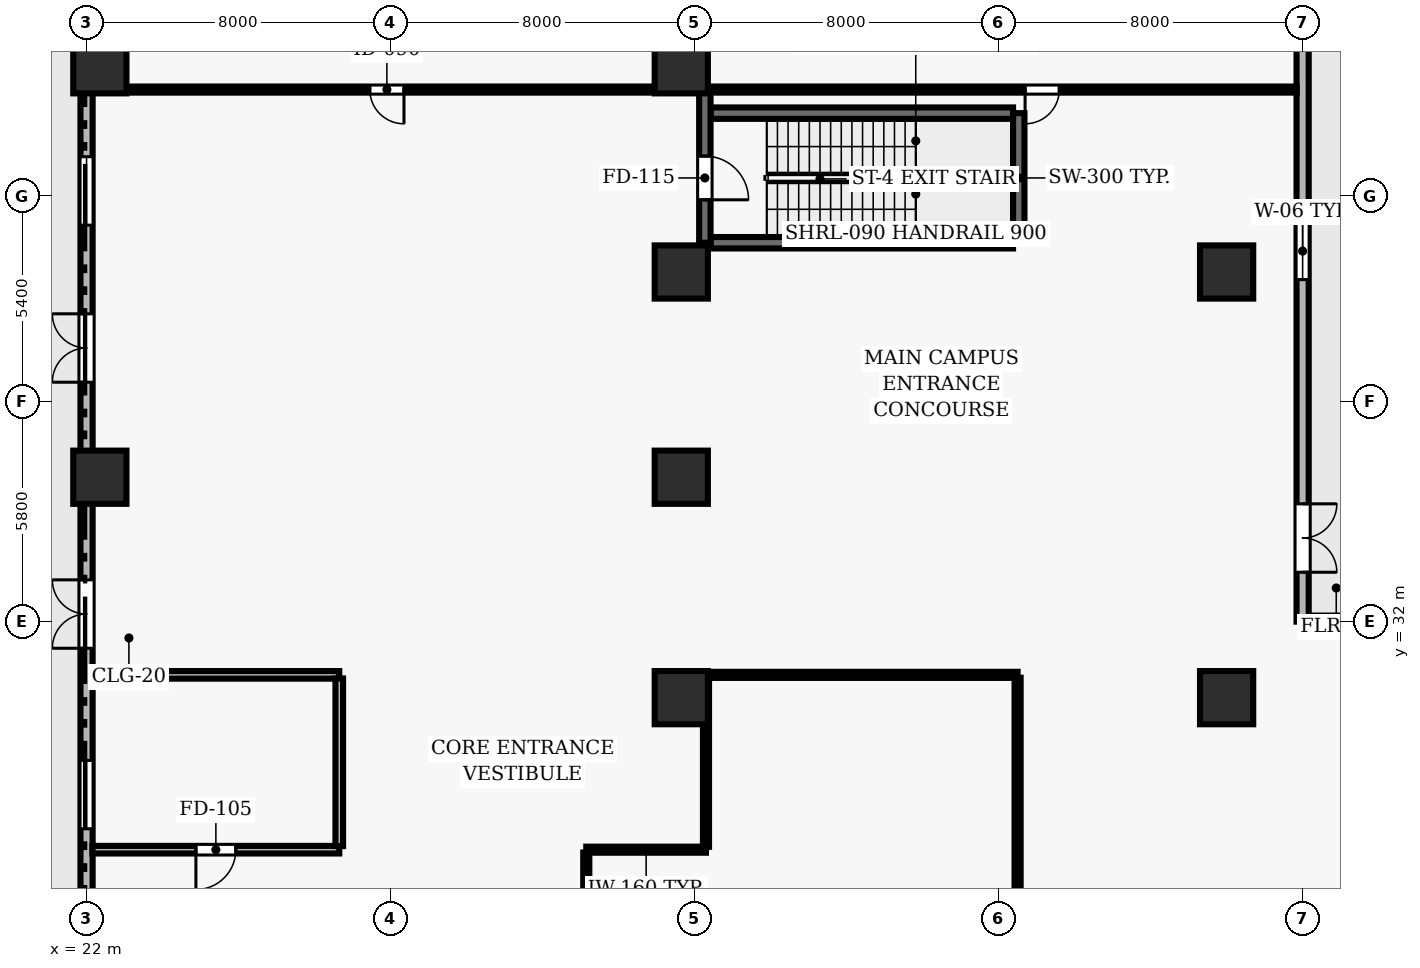
"""IFC4 building model, lengths in metres.
Left out: names, types, materials, properties, quantities, classifications, styles, units other than length and angle.
Written with IfcOpenShell. Run it as: python <this file> out.ifc"""

import sys

from ifc_helpers import new_model, si_unit, direction, frame, frame_2d, origin, origin_2d, place, context, subcontext, project, spatial, rectangle, extrude, element, fill, save


model = new_model("IFC4")
c1 = context("Model", 3, precision=1e-05, world=origin(), true_north=direction((0.0, 1.0)))
c2 = subcontext(c1, "Body", "Model", "MODEL_VIEW")
j1 = project(units=[si_unit("LENGTHUNIT", "METRE"), si_unit("PLANEANGLEUNIT", "RADIAN")], contexts=[c1])
p1 = place(None, origin())
s1 = spatial("IfcSite", under=j1, at=p1, CompositionType="ELEMENT")
p2 = place(p1, origin())
s2 = spatial("IfcBuilding", under=s1, at=p2, CompositionType="ELEMENT")
p3 = place(p2, origin())
s3 = spatial("IfcBuildingStorey", under=s2, at=p3, CompositionType="ELEMENT", Elevation=0.0)
for number, where, z_axis, x_axis in (
    (1, (37.65, 30.0, 0.0), (0.0, 0.0, 1.0), (1.0, 0.0, 0.0)),
    (2, (22.35, 35.8, 0.0), (0.0, 0.0, 1.0), (1.0, 0.0, 0.0)),
    (3, (37.65, 35.8, 0.0), (0.0, 0.0, 1.0), (1.0, 0.0, 0.0)),
    (4, (37.65, 41.2, 0.0), (0.0, 0.0, 1.0), (1.0, 0.0, 0.0)),
    (5, (22.35, 46.6, 0.0), (0.0, 0.0, 1.0), (1.0, 0.0, 0.0)),
    (6, (37.65, 46.6, 0.0), (0.0, 0.0, 1.0), (1.0, 0.0, 0.0)),
    (7, (52.0, 30.0, 0.0), (0.0, 0.0, 1.0), (1.0, 0.0, 0.0)),
    (8, (52.0, 41.2, 0.0), (0.0, 0.0, 1.0), (1.0, 0.0, 0.0)),
):
    element("IfcColumn", number, at=place(p3, frame(where, z_axis=z_axis, x_axis=x_axis)), inside=s3, PredefinedType="COLUMN", context=c2, shape_type="SweptSolid", body=[
        extrude(rectangle(XDim=1.4, YDim=1.4, at=origin_2d()), origin(), (0.0, 0.0, 1.0), 5.2),
    ])
p4 = place(p3, frame((73.5, 32.0, 0.0), z_axis=(0.0, 0.0, 1.0), x_axis=(-1.0, 0.0, 0.0)))
e9 = element("IfcWall", 9, at=p4, inside=s3, PredefinedType="SOLIDWALL", context=c2, shape_type="SweptSolid", body=[
    extrude(rectangle(XDim=19.5, YDim=0.32, at=frame_2d((9.75, 0.0))), origin(), (0.0, 0.0, 1.0), 4.92),
])
p5 = place(p4, frame((15.1, 0.0, 0.0)))
e10 = element("IfcOpeningElement", 10, at=p5, cuts=e9, PredefinedType="OPENING", context=c2, shape_type="SweptSolid", body=[
    extrude(rectangle(XDim=1.8, YDim=2.4, at=frame_2d((0.9, 1.2))), frame((0.0, 0.17, 0.0), z_axis=(0.0, -1.0, 0.0), x_axis=(1.0, 0.0, 0.0)), (0.0, 0.0, 1.0), 0.34),
])
p6 = place(p4, frame((10.1, 0.0, 0.0)))
e11 = element("IfcOpeningElement", 11, at=p6, cuts=e9, PredefinedType="OPENING", context=c2, shape_type="SweptSolid", body=[
    extrude(rectangle(XDim=1.8, YDim=2.4, at=frame_2d((0.9, 1.2))), frame((0.0, 0.17, 0.0), z_axis=(0.0, -1.0, 0.0), x_axis=(1.0, 0.0, 0.0)), (0.0, 0.0, 1.0), 0.34),
])
p7 = place(p4, frame((4.1, 0.0, 0.0)))
e12 = element("IfcOpeningElement", 12, at=p7, cuts=e9, PredefinedType="OPENING", context=c2, shape_type="SweptSolid", body=[
    extrude(rectangle(XDim=1.8, YDim=2.4, at=frame_2d((0.9, 1.2))), frame((0.0, 0.17, 0.0), z_axis=(0.0, -1.0, 0.0), x_axis=(1.0, 0.0, 0.0)), (0.0, 0.0, 1.0), 0.34),
])
p8 = place(p4, frame((1.15, 0.0, 0.9)))
e13 = element("IfcOpeningElement", 13, at=p8, cuts=e9, PredefinedType="OPENING", context=c2, shape_type="SweptSolid", body=[
    extrude(rectangle(XDim=2.4, YDim=1.6, at=frame_2d((1.2, 0.8))), frame((0.0, 0.17, 0.0), z_axis=(0.0, -1.0, 0.0), x_axis=(1.0, 0.0, 0.0)), (0.0, 0.0, 1.0), 0.34),
])
p9 = place(p3, frame((54.0, 32.0, 0.0), z_axis=(0.0, 0.0, 1.0), x_axis=(0.0, 1.0, 0.0)))
e14 = element("IfcWall", 14, at=p9, inside=s3, PredefinedType="SOLIDWALL", context=c2, shape_type="SweptSolid", body=[
    extrude(rectangle(XDim=19.5, YDim=0.32, at=frame_2d((9.75, 0.0))), origin(), (0.0, 0.0, 1.0), 4.92),
])
p10 = place(p9, frame((1.3, 0.0, 0.0)))
e15 = element("IfcOpeningElement", 15, at=p10, cuts=e14, PredefinedType="OPENING", context=c2, shape_type="SweptSolid", body=[
    extrude(rectangle(XDim=1.8, YDim=2.4, at=frame_2d((0.9, 1.2))), frame((0.0, 0.17, 0.0), z_axis=(0.0, -1.0, 0.0), x_axis=(1.0, 0.0, 0.0)), (0.0, 0.0, 1.0), 0.34),
])
p11 = place(p9, frame((15.3, 0.0, 0.0)))
e16 = element("IfcOpeningElement", 16, at=p11, cuts=e14, PredefinedType="OPENING", context=c2, shape_type="SweptSolid", body=[
    extrude(rectangle(XDim=1.8, YDim=2.4, at=frame_2d((0.9, 1.2))), frame((0.0, 0.17, 0.0), z_axis=(0.0, -1.0, 0.0), x_axis=(1.0, 0.0, 0.0)), (0.0, 0.0, 1.0), 0.34),
])
p12 = place(p9, frame((9.0, 0.0, 0.9)))
e17 = element("IfcOpeningElement", 17, at=p12, cuts=e14, PredefinedType="OPENING", context=c2, shape_type="SweptSolid", body=[
    extrude(rectangle(XDim=1.5, YDim=1.8, at=frame_2d((0.75, 0.9))), frame((0.0, 0.17, 0.0), z_axis=(0.0, -1.0, 0.0), x_axis=(1.0, 0.0, 0.0)), (0.0, 0.0, 1.0), 0.34),
])
p13 = place(p3, frame((22.0, 51.5, 0.0), z_axis=(0.0, 0.0, 1.0), x_axis=(0.0, -1.0, 0.0)))
e18 = element("IfcWall", 18, at=p13, inside=s3, PredefinedType="SOLIDWALL", context=c2, shape_type="SweptSolid", body=[
    extrude(rectangle(XDim=49.0, YDim=0.32, at=frame_2d((24.5, 0.0))), origin(), (0.0, 0.0, 1.0), 4.92),
])
p14 = place(p13, frame((11.4, 0.0, 0.0)))
e19 = element("IfcOpeningElement", 19, at=p14, cuts=e18, PredefinedType="OPENING", context=c2, shape_type="SweptSolid", body=[
    extrude(rectangle(XDim=1.8, YDim=2.4, at=frame_2d((0.9, 1.2))), frame((0.0, 0.17, 0.0), z_axis=(0.0, -1.0, 0.0), x_axis=(1.0, 0.0, 0.0)), (0.0, 0.0, 1.0), 0.34),
])
p15 = place(p13, frame((18.4, 0.0, 0.0)))
e20 = element("IfcOpeningElement", 20, at=p15, cuts=e18, PredefinedType="OPENING", context=c2, shape_type="SweptSolid", body=[
    extrude(rectangle(XDim=1.8, YDim=2.4, at=frame_2d((0.9, 1.2))), frame((0.0, 0.17, 0.0), z_axis=(0.0, -1.0, 0.0), x_axis=(1.0, 0.0, 0.0)), (0.0, 0.0, 1.0), 0.34),
])
p16 = place(p13, frame((1.822, 0.0, 0.9)))
e21 = element("IfcOpeningElement", 21, at=p16, cuts=e18, PredefinedType="OPENING", context=c2, shape_type="SweptSolid", body=[
    extrude(rectangle(XDim=1.8, YDim=2.2, at=frame_2d((0.9, 1.1))), frame((0.0, 0.17, 0.0), z_axis=(0.0, -1.0, 0.0), x_axis=(1.0, 0.0, 0.0)), (0.0, 0.0, 1.0), 0.34),
])
p17 = place(p13, frame((7.267, 0.0, 0.9)))
e22 = element("IfcOpeningElement", 22, at=p17, cuts=e18, PredefinedType="OPENING", context=c2, shape_type="SweptSolid", body=[
    extrude(rectangle(XDim=1.8, YDim=2.2, at=frame_2d((0.9, 1.1))), frame((0.0, 0.17, 0.0), z_axis=(0.0, -1.0, 0.0), x_axis=(1.0, 0.0, 0.0)), (0.0, 0.0, 1.0), 0.34),
])
p18 = place(p13, frame((23.15, 0.0, 0.9)))
e23 = element("IfcOpeningElement", 23, at=p18, cuts=e18, PredefinedType="OPENING", context=c2, shape_type="SweptSolid", body=[
    extrude(rectangle(XDim=1.8, YDim=2.2, at=frame_2d((0.9, 1.1))), frame((0.0, 0.17, 0.0), z_axis=(0.0, -1.0, 0.0), x_axis=(1.0, 0.0, 0.0)), (0.0, 0.0, 1.0), 0.34),
])
p19 = place(p13, frame((29.494, 0.0, 0.9)))
e24 = element("IfcOpeningElement", 24, at=p19, cuts=e18, PredefinedType="OPENING", context=c2, shape_type="SweptSolid", body=[
    extrude(rectangle(XDim=1.8, YDim=2.2, at=frame_2d((0.9, 1.1))), frame((0.0, 0.17, 0.0), z_axis=(0.0, -1.0, 0.0), x_axis=(1.0, 0.0, 0.0)), (0.0, 0.0, 1.0), 0.34),
])
p20 = place(p13, frame((34.039, 0.0, 0.9)))
e25 = element("IfcOpeningElement", 25, at=p20, cuts=e18, PredefinedType="OPENING", context=c2, shape_type="SweptSolid", body=[
    extrude(rectangle(XDim=1.8, YDim=2.2, at=frame_2d((0.9, 1.1))), frame((0.0, 0.17, 0.0), z_axis=(0.0, -1.0, 0.0), x_axis=(1.0, 0.0, 0.0)), (0.0, 0.0, 1.0), 0.34),
])
p21 = place(p13, frame((39.933, 0.0, 0.9)))
e26 = element("IfcOpeningElement", 26, at=p21, cuts=e18, PredefinedType="OPENING", context=c2, shape_type="SweptSolid", body=[
    extrude(rectangle(XDim=1.8, YDim=2.2, at=frame_2d((0.9, 1.1))), frame((0.0, 0.17, 0.0), z_axis=(0.0, -1.0, 0.0), x_axis=(1.0, 0.0, 0.0)), (0.0, 0.0, 1.0), 0.34),
])
p22 = place(p3, frame((38.42, 41.97, 0.0), z_axis=(0.0, 0.0, 1.0), x_axis=(1.0, 0.0, 0.0)))
e27 = element("IfcWall", 27, at=p22, inside=s3, PredefinedType="SHEAR", context=c2, shape_type="SweptSolid", body=[
    extrude(rectangle(XDim=7.96, YDim=0.3, at=frame_2d((3.98, 0.0))), origin(), (0.0, 0.0, 1.0), 4.92),
])
p23 = place(p3, frame((46.53, 41.97, 0.0), z_axis=(0.0, 0.0, 1.0), x_axis=(0.0, 1.0, 0.0)))
e28 = element("IfcWall", 28, at=p23, inside=s3, PredefinedType="SHEAR", context=c2, shape_type="SweptSolid", body=[
    extrude(rectangle(XDim=3.41, YDim=0.3, at=frame_2d((1.705, 0.0))), origin(), (0.0, 0.0, 1.0), 4.92),
])
p24 = place(p3, frame((46.38, 45.38, 0.0), z_axis=(0.0, 0.0, 1.0), x_axis=(-1.0, 0.0, 0.0)))
e29 = element("IfcWall", 29, at=p24, inside=s3, PredefinedType="SHEAR", context=c2, shape_type="SweptSolid", body=[
    extrude(rectangle(XDim=7.96, YDim=0.3, at=frame_2d((3.98, 0.0))), origin(), (0.0, 0.0, 1.0), 4.92),
])
p25 = place(p3, frame((38.27, 45.92, 0.0), z_axis=(0.0, 0.0, 1.0), x_axis=(0.0, -1.0, 0.0)))
e30 = element("IfcWall", 30, at=p25, inside=s3, PredefinedType="SHEAR", context=c2, shape_type="SweptSolid", body=[
    extrude(rectangle(XDim=3.95, YDim=0.3, at=frame_2d((1.975, 0.0))), origin(), (0.0, 0.0, 1.0), 4.92),
])
p26 = place(p25, frame((1.67, 0.0, 0.0)))
e31 = element("IfcOpeningElement", 31, at=p26, cuts=e30, PredefinedType="OPENING", context=c2, shape_type="SweptSolid", body=[
    extrude(rectangle(XDim=1.15, YDim=2.15, at=frame_2d((0.575, 1.075))), frame((0.0, 0.16, 0.0), z_axis=(0.0, -1.0, 0.0), x_axis=(1.0, 0.0, 0.0)), (0.0, 0.0, 1.0), 0.32),
])
p27 = place(p3, frame((28.65, 26.0, 0.0), z_axis=(0.0, 0.0, 1.0), x_axis=(-1.0, 0.0, 0.0)))
e32 = element("IfcWall", 32, at=p27, inside=s3, PredefinedType="SOLIDWALL", context=c2, shape_type="SweptSolid", body=[
    extrude(rectangle(XDim=6.495, YDim=0.2, at=frame_2d((3.248, 0.0))), origin(), (0.0, 0.0, 1.0), 4.92),
])
p28 = place(p27, frame((2.722, 0.0, 0.0)))
e33 = element("IfcOpeningElement", 33, at=p28, cuts=e32, PredefinedType="OPENING", context=c2, shape_type="SweptSolid", body=[
    extrude(rectangle(XDim=1.05, YDim=2.15, at=frame_2d((0.525, 1.075))), frame((0.0, 0.11, 0.0), z_axis=(0.0, -1.0, 0.0), x_axis=(1.0, 0.0, 0.0)), (0.0, 0.0, 1.0), 0.22),
])
p29 = place(p3, frame((28.65, 30.6, 0.0), z_axis=(0.0, 0.0, 1.0), x_axis=(-1.0, 0.0, 0.0)))
e34 = element("IfcWall", 34, at=p29, inside=s3, PredefinedType="SOLIDWALL", context=c2, shape_type="SweptSolid", body=[
    extrude(rectangle(XDim=6.495, YDim=0.2, at=frame_2d((3.248, 0.0))), origin(), (0.0, 0.0, 1.0), 4.92),
])
p30 = place(p3, frame((35.15, 26.0, 0.0), z_axis=(0.0, 0.0, 1.0), x_axis=(1.0, 0.0, 0.0)))
e35 = element("IfcWall", 35, at=p30, inside=s3, PredefinedType="PARTITIONING", context=c2, shape_type="SweptSolid", body=[
    extrude(rectangle(XDim=3.15, YDim=0.16, at=frame_2d((1.575, 0.0))), origin(), (0.0, 0.0, 1.0), 4.92),
])
p31 = place(p3, frame((37.65, 46.0, 0.0), z_axis=(0.0, 0.0, 1.0), x_axis=(-1.0, 0.0, 0.0)))
e36 = element("IfcWall", 36, at=p31, inside=s3, PredefinedType="PARTITIONING", context=c2, shape_type="SweptSolid", body=[
    extrude(rectangle(XDim=15.495, YDim=0.16, at=frame_2d((7.748, 0.0))), origin(), (0.0, 0.0, 1.0), 4.92),
])
p32 = place(p31, frame((7.297, 0.0, 0.0)))
e37 = element("IfcOpeningElement", 37, at=p32, cuts=e36, PredefinedType="OPENING", context=c2, shape_type="SweptSolid", body=[
    extrude(rectangle(XDim=0.9, YDim=2.1, at=frame_2d((0.45, 1.05))), frame((0.0, 0.09, 0.0), z_axis=(0.0, -1.0, 0.0), x_axis=(1.0, 0.0, 0.0)), (0.0, 0.0, 1.0), 0.18),
])
p33 = place(p3, frame((38.3, 30.6, 0.0), z_axis=(0.0, 0.0, 1.0), x_axis=(1.0, 0.0, 0.0)))
e38 = element("IfcWall", 38, at=p33, inside=s3, PredefinedType="PARTITIONING", context=c2, shape_type="SweptSolid", body=[
    extrude(rectangle(XDim=8.2, YDim=0.16, at=frame_2d((4.1, 0.0))), origin(), (0.0, 0.0, 1.0), 4.92),
])
p34 = place(p3, frame((53.845, 46.0, 0.0), z_axis=(0.0, 0.0, 1.0), x_axis=(-1.0, 0.0, 0.0)))
e39 = element("IfcWall", 39, at=p34, inside=s3, PredefinedType="PARTITIONING", context=c2, shape_type="SweptSolid", body=[
    extrude(rectangle(XDim=16.195, YDim=0.16, at=frame_2d((8.098, 0.0))), origin(), (0.0, 0.0, 1.0), 4.92),
])
p35 = place(p34, frame((6.248, 0.0, 0.0)))
e40 = element("IfcOpeningElement", 40, at=p35, cuts=e39, PredefinedType="OPENING", context=c2, shape_type="SweptSolid", body=[
    extrude(rectangle(XDim=0.9, YDim=2.1, at=frame_2d((0.45, 1.05))), frame((0.0, 0.09, 0.0), z_axis=(0.0, -1.0, 0.0), x_axis=(1.0, 0.0, 0.0)), (0.0, 0.0, 1.0), 0.18),
])
p36 = place(p3, frame((28.65, 26.095, 0.0), z_axis=(0.0, 0.0, 1.0), x_axis=(0.0, 1.0, 0.0)))
e41 = element("IfcWall", 41, at=p36, inside=s3, PredefinedType="SOLIDWALL", context=c2, shape_type="SweptSolid", body=[
    extrude(rectangle(XDim=4.41, YDim=0.2, at=frame_2d((2.205, 0.0))), origin(), (0.0, 0.0, 1.0), 4.92),
])
p37 = place(p3, frame((35.15, 24.07, 0.0), z_axis=(0.0, 0.0, 1.0), x_axis=(0.0, 1.0, 0.0)))
e42 = element("IfcWall", 42, at=p37, inside=s3, PredefinedType="PARTITIONING", context=c2, shape_type="SweptSolid", body=[
    extrude(rectangle(XDim=1.855, YDim=0.16, at=frame_2d((0.927, 0.0))), origin(), (0.0, 0.0, 1.0), 4.92),
])
p38 = place(p3, frame((37.65, 46.075, 0.0), z_axis=(0.0, 0.0, 1.0), x_axis=(0.0, 1.0, 0.0)))
e43 = element("IfcWall", 43, at=p38, inside=s3, PredefinedType="PARTITIONING", context=c2, shape_type="SweptSolid", body=[
    extrude(rectangle(XDim=7.77, YDim=0.125, at=frame_2d((3.885, 0.0))), origin(), (0.0, 0.0, 1.0), 4.065),
])
p39 = place(p3, frame((38.3, 26.075, 0.0), z_axis=(0.0, 0.0, 1.0), x_axis=(0.0, 1.0, 0.0)))
e44 = element("IfcWall", 44, at=p39, inside=s3, PredefinedType="PARTITIONING", context=c2, shape_type="SweptSolid", body=[
    extrude(rectangle(XDim=4.45, YDim=0.16, at=frame_2d((2.225, 0.0))), origin(), (0.0, 0.0, 1.0), 4.92),
])
p40 = place(p3, frame((46.5, 30.525, 0.0), z_axis=(0.0, 0.0, 1.0), x_axis=(0.0, -1.0, 0.0)))
e45 = element("IfcWall", 45, at=p40, inside=s3, PredefinedType="PARTITIONING", context=c2, shape_type="SweptSolid", body=[
    extrude(rectangle(XDim=9.525, YDim=0.16, at=frame_2d((4.762, 0.0))), origin(), (0.0, 0.0, 1.0), 4.451),
])
p41 = place(p10, origin())
e46 = element("IfcDoor", 46, at=p41, inside=s3, OperationType="DOUBLE_DOOR_SINGLE_SWING", PredefinedType="DOOR", context=c2, shape_type="SweptSolid", body=[
    extrude(rectangle(XDim=1.8, YDim=2.4, at=frame_2d((0.9, 1.2))), frame((0.0, 0.025, 0.0), z_axis=(0.0, -1.0, 0.0), x_axis=(1.0, 0.0, 0.0)), (0.0, 0.0, 1.0), 0.05),
])
fill(e15, e46)
p42 = place(p12, origin())
e47 = element("IfcWindow", 47, at=p42, inside=s3, PartitioningType="SINGLE_PANEL", PredefinedType="WINDOW", context=c2, shape_type="SweptSolid", body=[
    extrude(rectangle(XDim=1.5, YDim=1.8, at=frame_2d((0.75, 0.9))), frame((0.0, 0.03, 0.0), z_axis=(0.0, -1.0, 0.0), x_axis=(1.0, 0.0, 0.0)), (0.0, 0.0, 1.0), 0.06),
])
fill(e17, e47)
p43 = place(p14, origin())
e48 = element("IfcDoor", 48, at=p43, inside=s3, OperationType="DOUBLE_DOOR_SINGLE_SWING", PredefinedType="DOOR", context=c2, shape_type="SweptSolid", body=[
    extrude(rectangle(XDim=1.8, YDim=2.4, at=frame_2d((0.9, 1.2))), frame((0.0, 0.025, 0.0), z_axis=(0.0, -1.0, 0.0), x_axis=(1.0, 0.0, 0.0)), (0.0, 0.0, 1.0), 0.05),
])
fill(e19, e48)
p44 = place(p15, origin())
e49 = element("IfcDoor", 49, at=p44, inside=s3, OperationType="DOUBLE_DOOR_SINGLE_SWING", PredefinedType="DOOR", context=c2, shape_type="SweptSolid", body=[
    extrude(rectangle(XDim=1.8, YDim=2.4, at=frame_2d((0.9, 1.2))), frame((0.0, 0.025, 0.0), z_axis=(0.0, -1.0, 0.0), x_axis=(1.0, 0.0, 0.0)), (0.0, 0.0, 1.0), 0.05),
])
fill(e20, e49)
p45 = place(p17, origin())
e50 = element("IfcWindow", 50, at=p45, inside=s3, PartitioningType="SINGLE_PANEL", PredefinedType="WINDOW", context=c2, shape_type="SweptSolid", body=[
    extrude(rectangle(XDim=1.8, YDim=2.2, at=frame_2d((0.9, 1.1))), frame((0.0, 0.03, 0.0), z_axis=(0.0, -1.0, 0.0), x_axis=(1.0, 0.0, 0.0)), (0.0, 0.0, 1.0), 0.06),
])
fill(e22, e50)
p46 = place(p18, origin())
e51 = element("IfcWindow", 51, at=p46, inside=s3, PartitioningType="SINGLE_PANEL", PredefinedType="WINDOW", context=c2, shape_type="SweptSolid", body=[
    extrude(rectangle(XDim=1.8, YDim=2.2, at=frame_2d((0.9, 1.1))), frame((0.0, 0.03, 0.0), z_axis=(0.0, -1.0, 0.0), x_axis=(1.0, 0.0, 0.0)), (0.0, 0.0, 1.0), 0.06),
])
fill(e23, e51)
p47 = place(p26, origin())
e52 = element("IfcDoor", 52, at=p47, inside=s3, OperationType="SINGLE_SWING_RIGHT", PredefinedType="DOOR", context=c2, shape_type="SweptSolid", body=[
    extrude(rectangle(XDim=1.15, YDim=2.15, at=frame_2d((0.575, 1.075))), frame((0.0, 0.025, 0.0), z_axis=(0.0, -1.0, 0.0), x_axis=(1.0, 0.0, 0.0)), (0.0, 0.0, 1.0), 0.05),
])
fill(e31, e52)
p48 = place(p28, origin())
e53 = element("IfcDoor", 53, at=p48, inside=s3, OperationType="SINGLE_SWING_RIGHT", PredefinedType="DOOR", context=c2, shape_type="SweptSolid", body=[
    extrude(rectangle(XDim=1.05, YDim=2.15, at=frame_2d((0.525, 1.075))), frame((0.0, 0.025, 0.0), z_axis=(0.0, -1.0, 0.0), x_axis=(1.0, 0.0, 0.0)), (0.0, 0.0, 1.0), 0.05),
])
fill(e33, e53)
p49 = place(p32, origin())
e54 = element("IfcDoor", 54, at=p49, inside=s3, OperationType="SINGLE_SWING_LEFT", PredefinedType="DOOR", context=c2, shape_type="SweptSolid", body=[
    extrude(rectangle(XDim=0.9, YDim=2.1, at=frame_2d((0.45, 1.05))), frame((0.0, 0.025, 0.0), z_axis=(0.0, -1.0, 0.0), x_axis=(1.0, 0.0, 0.0)), (0.0, 0.0, 1.0), 0.05),
])
fill(e37, e54)
p50 = place(p35, origin())
e55 = element("IfcDoor", 55, at=p50, inside=s3, OperationType="SINGLE_SWING_RIGHT", PredefinedType="DOOR", context=c2, shape_type="SweptSolid", body=[
    extrude(rectangle(XDim=0.9, YDim=2.1, at=frame_2d((0.45, 1.05))), frame((0.0, 0.025, 0.0), z_axis=(0.0, -1.0, 0.0), x_axis=(1.0, 0.0, 0.0)), (0.0, 0.0, 1.0), 0.05),
])
fill(e40, e55)
save(model, sys.argv[1])
